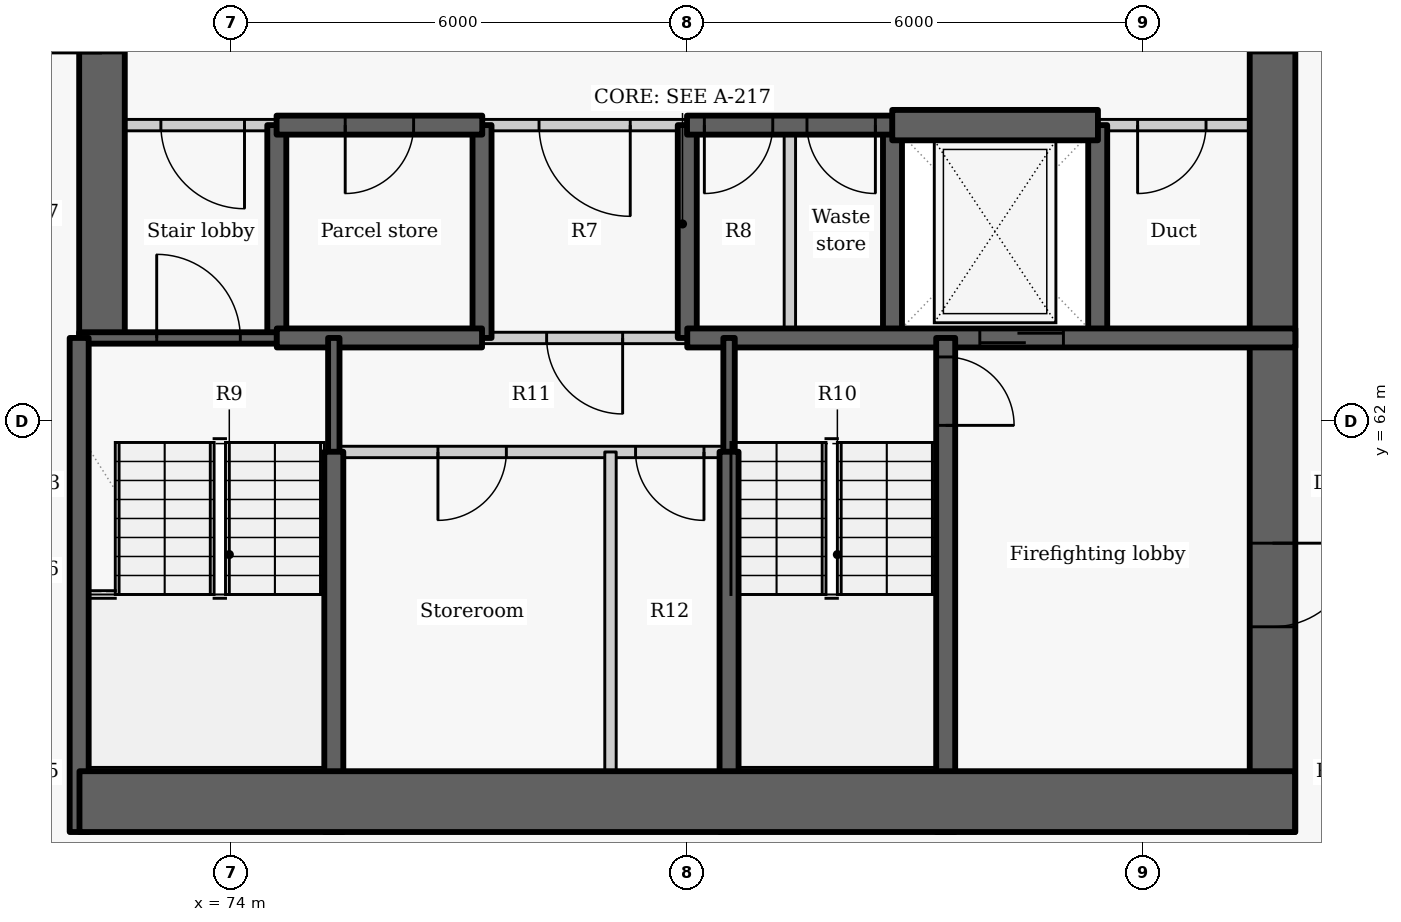
"""IFC4 building model, lengths in metres.
Left out: names, types, materials, properties, quantities, classifications, styles, units other than length and angle.
Written with IfcOpenShell. Run it as: python <this file> out.ifc"""

import sys

from ifc_helpers import new_model, si_unit, direction, frame, frame_2d, origin, place, context, subcontext, project, spatial, rectangle, extrude, element, fill, save


model = new_model("IFC4")
c1 = context("Model", 3, precision=1e-05, world=origin(), true_north=direction((0.0, 1.0)))
c2 = subcontext(c1, "Body", "Model", "MODEL_VIEW")
j1 = project(units=[si_unit("LENGTHUNIT", "METRE"), si_unit("PLANEANGLEUNIT", "RADIAN")], contexts=[c1])
p1 = place(None, origin())
s1 = spatial("IfcSite", under=j1, at=p1, CompositionType="ELEMENT")
p2 = place(p1, origin())
s2 = spatial("IfcBuilding", under=s1, at=p2, CompositionType="ELEMENT")
p3 = place(p2, frame((0.0, 0.0, 81.0)))
s3 = spatial("IfcBuildingStorey", under=s2, at=p3, CompositionType="ELEMENT", Elevation=81.0)
p4 = place(p3, frame((74.6, 63.1, -0.275), z_axis=(0.0, 0.0, 1.0), x_axis=(0.0, 1.0, 0.0)))
e1 = element("IfcWall", 1, at=p4, inside=s3, PredefinedType="SHEAR", context=c2, shape_type="SweptSolid", body=[
    extrude(rectangle(XDim=2.8, YDim=0.25, at=frame_2d((1.4, 0.0))), origin(), (0.0, 0.0, 1.0), 3.3),
])
p5 = place(p3, frame((72.3, 63.1, -0.275), z_axis=(0.0, 0.0, 1.0), x_axis=(0.0, 1.0, 0.0)))
e2 = element("IfcWall", 2, at=p5, inside=s3, PredefinedType="SHEAR", context=c2, shape_type="SweptSolid", body=[
    extrude(rectangle(XDim=9.1, YDim=0.6, at=frame_2d((4.55, 0.0))), origin(), (0.0, 0.0, 1.0), 3.3),
])
p6 = place(p5, frame((3.75, 0.0, 0.275)))
e3 = element("IfcOpeningElement", 3, at=p6, cuts=e2, PredefinedType="OPENING", context=c2, shape_type="SweptSolid", body=[
    extrude(rectangle(XDim=1.5, YDim=2.1, at=frame_2d((0.75, 1.05))), frame((0.0, 0.31, 0.0), z_axis=(0.0, -1.0, 0.0), x_axis=(1.0, 0.0, 0.0)), (0.0, 0.0, 1.0), 0.62),
])
for number, where, z_axis, x_axis in (
    (4, (77.3, 63.1, -0.275), (0.0, 0.0, 1.0), (0.0, 1.0, 0.0)),
    (5, (80.0, 63.1, -0.275), (0.0, 0.0, 1.0), (0.0, 1.0, 0.0)),
    (6, (82.7, 63.1, -0.275), (0.0, 0.0, 1.0), (0.0, 1.0, 0.0)),
    (7, (85.4, 63.1, -0.275), (0.0, 0.0, 1.0), (0.0, 1.0, 0.0)),
):
    element("IfcWall", number, at=place(p3, frame(where, z_axis=z_axis, x_axis=x_axis)), inside=s3, PredefinedType="SHEAR", context=c2, shape_type="SweptSolid", body=[
        extrude(rectangle(XDim=2.8, YDim=0.25, at=frame_2d((1.4, 0.0))), origin(), (0.0, 0.0, 1.0), 3.3),
    ])
p7 = place(p3, frame((87.7, 72.2, -0.275), z_axis=(0.0, 0.0, 1.0), x_axis=(0.0, -1.0, 0.0)))
e8 = element("IfcWall", 8, at=p7, inside=s3, PredefinedType="SHEAR", context=c2, shape_type="SweptSolid", body=[
    extrude(rectangle(XDim=15.6, YDim=0.6, at=frame_2d((7.8, 0.0))), origin(), (0.0, 0.0, 1.0), 3.3),
])
p8 = place(p7, frame((3.85, 0.0, 0.275)))
e9 = element("IfcOpeningElement", 9, at=p8, cuts=e8, PredefinedType="OPENING", context=c2, shape_type="SweptSolid", body=[
    extrude(rectangle(XDim=1.5, YDim=2.1, at=frame_2d((0.75, 1.05))), frame((0.0, 0.31, 0.0), z_axis=(0.0, -1.0, 0.0), x_axis=(1.0, 0.0, 0.0)), (0.0, 0.0, 1.0), 0.62),
])
p9 = place(p7, frame((11.8, 0.0, 0.275)))
e10 = element("IfcOpeningElement", 10, at=p9, cuts=e8, PredefinedType="OPENING", context=c2, shape_type="SweptSolid", body=[
    extrude(rectangle(XDim=1.1, YDim=2.1, at=frame_2d((0.55, 1.05))), frame((0.0, 0.31, 0.0), z_axis=(0.0, -1.0, 0.0), x_axis=(1.0, 0.0, 0.0)), (0.0, 0.0, 1.0), 0.62),
])
p10 = place(p3, frame((74.603, 65.9, 0.0), z_axis=(0.0, 0.0, 1.0), x_axis=(-1.0, 0.0, 0.0)))
e11 = element("IfcWall", 11, at=p10, inside=s3, PredefinedType="PARTITIONING", context=c2, shape_type="SweptSolid", body=[
    extrude(rectangle(XDim=2.603, YDim=0.15, at=frame_2d((1.302, 0.0))), origin(), (0.0, 0.0, 1.0), 3.025),
])
p11 = place(p10, frame((0.428, 0.0, 0.0)))
e12 = element("IfcOpeningElement", 12, at=p11, cuts=e11, PredefinedType="OPENING", context=c2, shape_type="SweptSolid", body=[
    extrude(rectangle(XDim=1.1, YDim=2.1, at=frame_2d((0.55, 1.05))), frame((0.0, 0.085, 0.0), z_axis=(0.0, -1.0, 0.0), x_axis=(1.0, 0.0, 0.0)), (0.0, 0.0, 1.0), 0.17),
])
p12 = place(p3, frame((80.003, 65.9, 0.0), z_axis=(0.0, 0.0, 1.0), x_axis=(-1.0, 0.0, 0.0)))
e13 = element("IfcWall", 13, at=p12, inside=s3, PredefinedType="PARTITIONING", context=c2, shape_type="SweptSolid", body=[
    extrude(rectangle(XDim=2.706, YDim=0.15, at=frame_2d((1.353, 0.0))), origin(), (0.0, 0.0, 1.0), 3.025),
])
p13 = place(p12, frame((0.753, 0.0, 0.0)))
e14 = element("IfcOpeningElement", 14, at=p13, cuts=e13, PredefinedType="OPENING", context=c2, shape_type="SweptSolid", body=[
    extrude(rectangle(XDim=1.2, YDim=2.1, at=frame_2d((0.6, 1.05))), frame((0.0, 0.085, 0.0), z_axis=(0.0, -1.0, 0.0), x_axis=(1.0, 0.0, 0.0)), (0.0, 0.0, 1.0), 0.17),
])
p14 = place(p3, frame((88.0, 65.9, 0.0), z_axis=(0.0, 0.0, 1.0), x_axis=(-1.0, 0.0, 0.0)))
e15 = element("IfcWall", 15, at=p14, inside=s3, PredefinedType="PARTITIONING", context=c2, shape_type="SweptSolid", body=[
    extrude(rectangle(XDim=2.603, YDim=0.15, at=frame_2d((1.302, 0.0))), origin(), (0.0, 0.0, 1.0), 3.025),
])
p15 = place(p14, frame((1.175, 0.0, 0.0)))
e16 = element("IfcOpeningElement", 16, at=p15, cuts=e15, PredefinedType="OPENING", context=c2, shape_type="SweptSolid", body=[
    extrude(rectangle(XDim=0.9, YDim=2.1, at=frame_2d((0.45, 1.05))), frame((0.0, 0.085, 0.0), z_axis=(0.0, -1.0, 0.0), x_axis=(1.0, 0.0, 0.0)), (0.0, 0.0, 1.0), 0.17),
])
p16 = place(p3, frame((77.303, 65.9, -0.275), z_axis=(0.0, 0.0, 1.0), x_axis=(-1.0, 0.0, 0.0)))
e17 = element("IfcWall", 17, at=p16, inside=s3, PredefinedType="SHEAR", context=c2, shape_type="SweptSolid", body=[
    extrude(rectangle(XDim=2.706, YDim=0.25, at=frame_2d((1.353, 0.0))), origin(), (0.0, 0.0, 1.0), 3.3),
])
p17 = place(p16, frame((0.903, 0.0, 0.275)))
e18 = element("IfcOpeningElement", 18, at=p17, cuts=e17, PredefinedType="OPENING", context=c2, shape_type="SweptSolid", body=[
    extrude(rectangle(XDim=0.9, YDim=2.1, at=frame_2d((0.45, 1.05))), frame((0.0, 0.135, 0.0), z_axis=(0.0, -1.0, 0.0), x_axis=(1.0, 0.0, 0.0)), (0.0, 0.0, 1.0), 0.27),
])
p18 = place(p3, frame((82.703, 65.9, -0.275), z_axis=(0.0, 0.0, 1.0), x_axis=(-1.0, 0.0, 0.0)))
e19 = element("IfcWall", 19, at=p18, inside=s3, PredefinedType="SHEAR", context=c2, shape_type="SweptSolid", body=[
    extrude(rectangle(XDim=2.706, YDim=0.25, at=frame_2d((1.353, 0.0))), origin(), (0.0, 0.0, 1.0), 3.3),
])
p19 = place(p18, frame((1.578, 0.0, 0.275)))
e20 = element("IfcOpeningElement", 20, at=p19, cuts=e19, PredefinedType="OPENING", context=c2, shape_type="SweptSolid", body=[
    extrude(rectangle(XDim=0.9, YDim=2.1, at=frame_2d((0.45, 1.05))), frame((0.0, 0.135, 0.0), z_axis=(0.0, -1.0, 0.0), x_axis=(1.0, 0.0, 0.0)), (0.0, 0.0, 1.0), 0.27),
])
p20 = place(p18, frame((0.228, 0.0, 0.275)))
e21 = element("IfcOpeningElement", 21, at=p20, cuts=e19, PredefinedType="OPENING", context=c2, shape_type="SweptSolid", body=[
    extrude(rectangle(XDim=0.9, YDim=2.1, at=frame_2d((0.45, 1.05))), frame((0.0, 0.135, 0.0), z_axis=(0.0, -1.0, 0.0), x_axis=(1.0, 0.0, 0.0)), (0.0, 0.0, 1.0), 0.27),
])
p21 = place(p3, frame((82.697, 65.9, -0.275), z_axis=(0.0, 0.0, 1.0), x_axis=(1.0, 0.0, 0.0)))
e22 = element("IfcWall", 22, at=p21, inside=s3, PredefinedType="SHEAR", context=c2, shape_type="SweptSolid", body=[
    extrude(rectangle(XDim=2.706, YDim=0.4, at=frame_2d((1.353, 0.0))), origin(), (0.0, 0.0, 1.0), 3.3),
])
p22 = place(p3, frame((72.0, 63.1, -0.275), z_axis=(0.0, 0.0, 1.0), x_axis=(1.0, 0.0, 0.0)))
e23 = element("IfcWall", 23, at=p22, inside=s3, PredefinedType="SHEAR", context=c2, shape_type="SweptSolid", body=[
    extrude(rectangle(XDim=2.6, YDim=0.15, at=frame_2d((1.3, 0.0))), origin(), (0.0, 0.0, 1.0), 3.3),
])
p23 = place(p22, frame((1.02, 0.0, 0.275)))
e24 = element("IfcOpeningElement", 24, at=p23, cuts=e23, PredefinedType="OPENING", context=c2, shape_type="SweptSolid", body=[
    extrude(rectangle(XDim=1.1, YDim=2.1, at=frame_2d((0.55, 1.05))), frame((0.0, 0.085, 0.0), z_axis=(0.0, -1.0, 0.0), x_axis=(1.0, 0.0, 0.0)), (0.0, 0.0, 1.0), 0.17),
])
p24 = place(p3, frame((74.6, 63.1, -0.275), z_axis=(0.0, 0.0, 1.0), x_axis=(1.0, 0.0, 0.0)))
e25 = element("IfcWall", 25, at=p24, inside=s3, PredefinedType="SHEAR", context=c2, shape_type="SweptSolid", body=[
    extrude(rectangle(XDim=2.7, YDim=0.25, at=frame_2d((1.35, 0.0))), origin(), (0.0, 0.0, 1.0), 3.3),
])
p25 = place(p3, frame((80.0, 63.1, -0.275), z_axis=(0.0, 0.0, 1.0), x_axis=(1.0, 0.0, 0.0)))
e26 = element("IfcWall", 26, at=p25, inside=s3, PredefinedType="SHEAR", context=c2, shape_type="SweptSolid", body=[
    extrude(rectangle(XDim=8.0, YDim=0.25, at=frame_2d((4.0, 0.0))), origin(), (0.0, 0.0, 1.0), 3.3),
])
p26 = place(p25, frame((3.849, 0.0, 0.275)))
e27 = element("IfcOpeningElement", 27, at=p26, cuts=e26, PredefinedType="OPENING", context=c2, shape_type="SweptSolid", body=[
    extrude(rectangle(XDim=1.1, YDim=2.1, at=frame_2d((0.55, 1.05))), frame((0.0, 0.135, 0.0), z_axis=(0.0, -1.0, 0.0), x_axis=(1.0, 0.0, 0.0)), (0.0, 0.0, 1.0), 0.27),
])
p27 = place(p3, frame((80.0, 63.1, 0.0), z_axis=(0.0, 0.0, 1.0), x_axis=(-1.0, 0.0, 0.0)))
e28 = element("IfcWall", 28, at=p27, inside=s3, PredefinedType="PARTITIONING", context=c2, shape_type="SweptSolid", body=[
    extrude(rectangle(XDim=2.7, YDim=0.15, at=frame_2d((1.35, 0.0))), origin(), (0.0, 0.0, 1.0), 3.025),
])
p28 = place(p27, frame((0.85, 0.0, 0.0)))
e29 = element("IfcOpeningElement", 29, at=p28, cuts=e28, PredefinedType="OPENING", context=c2, shape_type="SweptSolid", body=[
    extrude(rectangle(XDim=1.0, YDim=2.1, at=frame_2d((0.5, 1.05))), frame((0.0, 0.085, 0.0), z_axis=(0.0, -1.0, 0.0), x_axis=(1.0, 0.0, 0.0)), (0.0, 0.0, 1.0), 0.17),
])
p29 = place(p3, frame((81.35, 63.1, 0.0), z_axis=(0.0, 0.0, 1.0), x_axis=(0.0, 1.0, 0.0)))
e30 = element("IfcWall", 30, at=p29, inside=s3, PredefinedType="PARTITIONING", context=c2, shape_type="SweptSolid", body=[
    extrude(rectangle(XDim=2.8, YDim=0.15, at=frame_2d((1.4, 0.0))), origin(), (0.0, 0.0, 1.0), 3.025),
])
p30 = place(p3, frame((75.35, 61.597, -0.275), z_axis=(0.0, 0.0, 1.0), x_axis=(0.0, 1.0, 0.0)))
e31 = element("IfcWall", 31, at=p30, inside=s3, PredefinedType="SHEAR", context=c2, shape_type="SweptSolid", body=[
    extrude(rectangle(XDim=1.503, YDim=0.15, at=frame_2d((0.751, 0.0))), origin(), (0.0, 0.0, 1.0), 3.3),
])
p31 = place(p3, frame((75.35, 56.6, -0.275), z_axis=(0.0, 0.0, 1.0), x_axis=(0.0, 1.0, 0.0)))
e32 = element("IfcWall", 32, at=p31, inside=s3, PredefinedType="SHEAR", context=c2, shape_type="SweptSolid", body=[
    extrude(rectangle(XDim=5.003, YDim=0.25, at=frame_2d((2.501, 0.0))), origin(), (0.0, 0.0, 1.0), 3.3),
])
p32 = place(p3, frame((72.0, 56.6, -0.275), z_axis=(0.0, 0.0, 1.0), x_axis=(0.0, 1.0, 0.0)))
e33 = element("IfcWall", 33, at=p32, inside=s3, PredefinedType="SHEAR", context=c2, shape_type="SweptSolid", body=[
    extrude(rectangle(XDim=6.5, YDim=0.25, at=frame_2d((3.25, 0.0))), origin(), (0.0, 0.0, 1.0), 3.3),
])
p33 = place(p3, frame((83.4, 63.1, -0.275), z_axis=(0.0, 0.0, 1.0), x_axis=(0.0, -1.0, 0.0)))
e34 = element("IfcWall", 34, at=p33, inside=s3, PredefinedType="SHEAR", context=c2, shape_type="SweptSolid", body=[
    extrude(rectangle(XDim=6.5, YDim=0.25, at=frame_2d((3.25, 0.0))), origin(), (0.0, 0.0, 1.0), 3.3),
])
p34 = place(p33, frame((0.25, 0.0, 0.275)))
e35 = element("IfcOpeningElement", 35, at=p34, cuts=e34, PredefinedType="OPENING", context=c2, shape_type="SweptSolid", body=[
    extrude(rectangle(XDim=0.9, YDim=2.1, at=frame_2d((0.45, 1.05))), frame((0.0, 0.135, 0.0), z_axis=(0.0, -1.0, 0.0), x_axis=(1.0, 0.0, 0.0)), (0.0, 0.0, 1.0), 0.27),
])
p35 = place(p3, frame((80.55, 61.597, -0.275), z_axis=(0.0, 0.0, 1.0), x_axis=(0.0, 1.0, 0.0)))
e36 = element("IfcWall", 36, at=p35, inside=s3, PredefinedType="SHEAR", context=c2, shape_type="SweptSolid", body=[
    extrude(rectangle(XDim=1.503, YDim=0.15, at=frame_2d((0.751, 0.0))), origin(), (0.0, 0.0, 1.0), 3.3),
])
p36 = place(p3, frame((80.55, 56.6, -0.275), z_axis=(0.0, 0.0, 1.0), x_axis=(0.0, 1.0, 0.0)))
e37 = element("IfcWall", 37, at=p36, inside=s3, PredefinedType="SHEAR", context=c2, shape_type="SweptSolid", body=[
    extrude(rectangle(XDim=5.003, YDim=0.25, at=frame_2d((2.501, 0.0))), origin(), (0.0, 0.0, 1.0), 3.3),
])
p37 = place(p3, frame((80.55, 61.6, 0.0), z_axis=(0.0, 0.0, 1.0), x_axis=(-1.0, 0.0, 0.0)))
e38 = element("IfcWall", 38, at=p37, inside=s3, PredefinedType="PARTITIONING", context=c2, shape_type="SweptSolid", body=[
    extrude(rectangle(XDim=5.2, YDim=0.15, at=frame_2d((2.6, 0.0))), origin(), (0.0, 0.0, 1.0), 3.025),
])
p38 = place(p37, frame((2.93, 0.0, 0.0)))
e39 = element("IfcOpeningElement", 39, at=p38, cuts=e38, PredefinedType="OPENING", context=c2, shape_type="SweptSolid", body=[
    extrude(rectangle(XDim=0.9, YDim=2.1, at=frame_2d((0.45, 1.05))), frame((0.0, 0.085, 0.0), z_axis=(0.0, -1.0, 0.0), x_axis=(1.0, 0.0, 0.0)), (0.0, 0.0, 1.0), 0.17),
])
p39 = place(p37, frame((0.33, 0.0, 0.0)))
e40 = element("IfcOpeningElement", 40, at=p39, cuts=e38, PredefinedType="OPENING", context=c2, shape_type="SweptSolid", body=[
    extrude(rectangle(XDim=0.9, YDim=2.1, at=frame_2d((0.45, 1.05))), frame((0.0, 0.085, 0.0), z_axis=(0.0, -1.0, 0.0), x_axis=(1.0, 0.0, 0.0)), (0.0, 0.0, 1.0), 0.17),
])
p40 = place(p3, frame((78.99, 56.6, 0.0), z_axis=(0.0, 0.0, 1.0), x_axis=(0.0, 1.0, 0.0)))
e41 = element("IfcWall", 41, at=p40, inside=s3, PredefinedType="PARTITIONING", context=c2, shape_type="SweptSolid", body=[
    extrude(rectangle(XDim=5.0, YDim=0.15, at=frame_2d((2.5, 0.0))), origin(), (0.0, 0.0, 1.0), 3.025),
])
p41 = place(p3, frame((72.004, 57.0, -0.275), z_axis=(0.0, 0.0, 1.0), x_axis=(1.0, 0.0, 0.0)))
e42 = element("IfcWall", 42, at=p41, inside=s3, PredefinedType="SHEAR", context=c2, shape_type="SweptSolid", body=[
    extrude(rectangle(XDim=15.992, YDim=0.8, at=frame_2d((7.996, 0.0))), origin(), (0.0, 0.0, 1.0), 3.3),
])
p42 = place(p11, origin())
e43 = element("IfcDoor", 43, at=p42, inside=s3, OperationType="SINGLE_SWING_LEFT", PredefinedType="DOOR", context=c2, shape_type="SweptSolid", body=[
    extrude(rectangle(XDim=1.1, YDim=2.1, at=frame_2d((0.55, 1.05))), frame((0.0, 0.025, 0.0), z_axis=(0.0, -1.0, 0.0), x_axis=(1.0, 0.0, 0.0)), (0.0, 0.0, 1.0), 0.05),
])
fill(e12, e43)
p43 = place(p17, origin())
e44 = element("IfcDoor", 44, at=p43, inside=s3, OperationType="SINGLE_SWING_RIGHT", PredefinedType="DOOR", context=c2, shape_type="SweptSolid", body=[
    extrude(rectangle(XDim=0.9, YDim=2.1, at=frame_2d((0.45, 1.05))), frame((0.0, 0.025, 0.0), z_axis=(0.0, -1.0, 0.0), x_axis=(1.0, 0.0, 0.0)), (0.0, 0.0, 1.0), 0.05),
])
fill(e18, e44)
p44 = place(p13, origin())
e45 = element("IfcDoor", 45, at=p44, inside=s3, OperationType="DOUBLE_DOOR_SINGLE_SWING", PredefinedType="DOOR", context=c2, shape_type="SweptSolid", body=[
    extrude(rectangle(XDim=1.2, YDim=2.1, at=frame_2d((0.6, 1.05))), frame((0.0, 0.025, 0.0), z_axis=(0.0, -1.0, 0.0), x_axis=(1.0, 0.0, 0.0)), (0.0, 0.0, 1.0), 0.05),
])
fill(e14, e45)
p45 = place(p19, origin())
e46 = element("IfcDoor", 46, at=p45, inside=s3, OperationType="SINGLE_SWING_RIGHT", PredefinedType="DOOR", context=c2, shape_type="SweptSolid", body=[
    extrude(rectangle(XDim=0.9, YDim=2.1, at=frame_2d((0.45, 1.05))), frame((0.0, 0.025, 0.0), z_axis=(0.0, -1.0, 0.0), x_axis=(1.0, 0.0, 0.0)), (0.0, 0.0, 1.0), 0.05),
])
fill(e20, e46)
p46 = place(p20, origin())
e47 = element("IfcDoor", 47, at=p46, inside=s3, OperationType="SINGLE_SWING_LEFT", PredefinedType="DOOR", context=c2, shape_type="SweptSolid", body=[
    extrude(rectangle(XDim=0.9, YDim=2.1, at=frame_2d((0.45, 1.05))), frame((0.0, 0.025, 0.0), z_axis=(0.0, -1.0, 0.0), x_axis=(1.0, 0.0, 0.0)), (0.0, 0.0, 1.0), 0.05),
])
fill(e21, e47)
p47 = place(p26, origin())
e48 = element("IfcDoor", 48, at=p47, inside=s3, OperationType="SLIDING_TO_LEFT", PredefinedType="DOOR", context=c2, shape_type="SweptSolid", body=[
    extrude(rectangle(XDim=1.1, YDim=2.1, at=frame_2d((0.55, 1.05))), frame((0.0, 0.025, 0.0), z_axis=(0.0, -1.0, 0.0), x_axis=(1.0, 0.0, 0.0)), (0.0, 0.0, 1.0), 0.05),
])
fill(e27, e48)
p48 = place(p15, origin())
e49 = element("IfcDoor", 49, at=p48, inside=s3, OperationType="SINGLE_SWING_RIGHT", PredefinedType="DOOR", context=c2, shape_type="SweptSolid", body=[
    extrude(rectangle(XDim=0.9, YDim=2.1, at=frame_2d((0.45, 1.05))), frame((0.0, 0.025, 0.0), z_axis=(0.0, -1.0, 0.0), x_axis=(1.0, 0.0, 0.0)), (0.0, 0.0, 1.0), 0.05),
])
fill(e16, e49)
p49 = place(p28, origin())
e50 = element("IfcDoor", 50, at=p49, inside=s3, OperationType="SINGLE_SWING_LEFT", PredefinedType="DOOR", context=c2, shape_type="SweptSolid", body=[
    extrude(rectangle(XDim=1.0, YDim=2.1, at=frame_2d((0.5, 1.05))), frame((0.0, 0.025, 0.0), z_axis=(0.0, -1.0, 0.0), x_axis=(1.0, 0.0, 0.0)), (0.0, 0.0, 1.0), 0.05),
])
fill(e29, e50)
p50 = place(p38, origin())
e51 = element("IfcDoor", 51, at=p50, inside=s3, OperationType="SINGLE_SWING_RIGHT", PredefinedType="DOOR", context=c2, shape_type="SweptSolid", body=[
    extrude(rectangle(XDim=0.9, YDim=2.1, at=frame_2d((0.45, 1.05))), frame((0.0, 0.025, 0.0), z_axis=(0.0, -1.0, 0.0), x_axis=(1.0, 0.0, 0.0)), (0.0, 0.0, 1.0), 0.05),
])
fill(e39, e51)
p51 = place(p39, origin())
e52 = element("IfcDoor", 52, at=p51, inside=s3, OperationType="SINGLE_SWING_LEFT", PredefinedType="DOOR", context=c2, shape_type="SweptSolid", body=[
    extrude(rectangle(XDim=0.9, YDim=2.1, at=frame_2d((0.45, 1.05))), frame((0.0, 0.025, 0.0), z_axis=(0.0, -1.0, 0.0), x_axis=(1.0, 0.0, 0.0)), (0.0, 0.0, 1.0), 0.05),
])
fill(e40, e52)
p52 = place(p23, origin())
e53 = element("IfcDoor", 53, at=p52, inside=s3, OperationType="SINGLE_SWING_LEFT", PredefinedType="DOOR", context=c2, shape_type="SweptSolid", body=[
    extrude(rectangle(XDim=1.1, YDim=2.1, at=frame_2d((0.55, 1.05))), frame((0.0, 0.025, 0.0), z_axis=(0.0, -1.0, 0.0), x_axis=(1.0, 0.0, 0.0)), (0.0, 0.0, 1.0), 0.05),
])
fill(e24, e53)
p53 = place(p34, origin())
e54 = element("IfcDoor", 54, at=p53, inside=s3, OperationType="SINGLE_SWING_RIGHT", PredefinedType="DOOR", context=c2, shape_type="SweptSolid", body=[
    extrude(rectangle(XDim=0.9, YDim=2.1, at=frame_2d((0.45, 1.05))), frame((0.0, 0.025, 0.0), z_axis=(0.0, -1.0, 0.0), x_axis=(1.0, 0.0, 0.0)), (0.0, 0.0, 1.0), 0.05),
])
fill(e35, e54)
p54 = place(p8, origin())
e55 = element("IfcDoor", 55, at=p54, inside=s3, OperationType="DOUBLE_DOOR_SINGLE_SWING", PredefinedType="DOOR", context=c2, shape_type="SweptSolid", body=[
    extrude(rectangle(XDim=1.5, YDim=2.1, at=frame_2d((0.75, 1.05))), frame((0.0, 0.025, 0.0), z_axis=(0.0, -1.0, 0.0), x_axis=(1.0, 0.0, 0.0)), (0.0, 0.0, 1.0), 0.05),
])
fill(e9, e55)
p55 = place(p9, origin())
e56 = element("IfcDoor", 56, at=p55, inside=s3, OperationType="SINGLE_SWING_LEFT", PredefinedType="DOOR", context=c2, shape_type="SweptSolid", body=[
    extrude(rectangle(XDim=1.1, YDim=2.1, at=frame_2d((0.55, 1.05))), frame((0.0, 0.025, 0.0), z_axis=(0.0, -1.0, 0.0), x_axis=(1.0, 0.0, 0.0)), (0.0, 0.0, 1.0), 0.05),
])
fill(e10, e56)
save(model, sys.argv[1])
